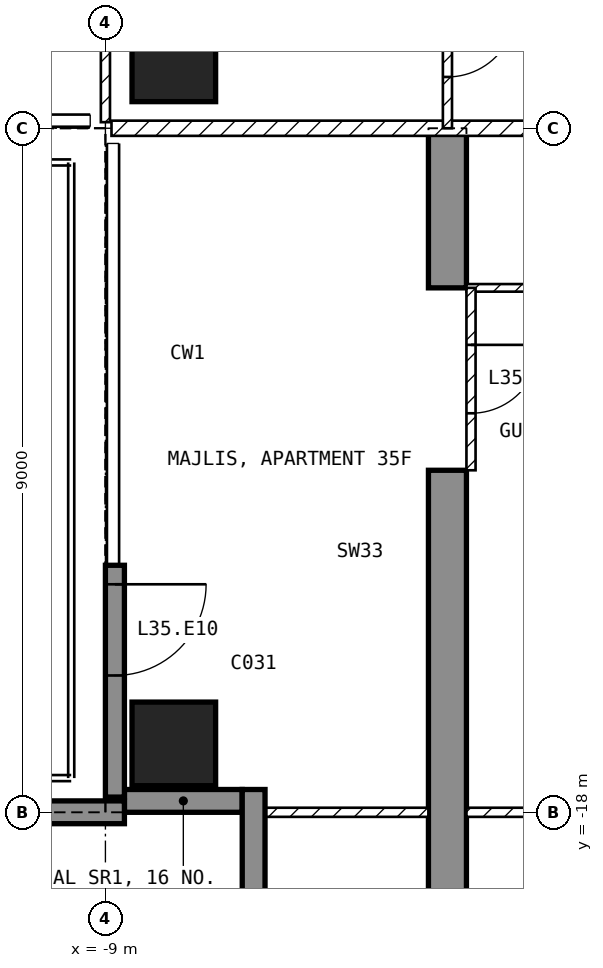
"""IFC4 building model, lengths in metres.
Left out: names, types, materials, properties, quantities, classifications, styles, units other than length and angle.
Written with IfcOpenShell. Run it as: python <this file> out.ifc"""

import sys

from ifc_helpers import new_model, si_unit, direction, frame, frame_2d, origin, origin_2d, place, context, subcontext, project, spatial, polyline, rectangle, outline, extrude, element, fill, save


model = new_model("IFC4")
c1 = context("Model", 3, precision=1e-05, world=origin(), true_north=direction((0.0, 1.0)))
c2 = subcontext(c1, "Body", "Model", "MODEL_VIEW")
j1 = project(units=[si_unit("LENGTHUNIT", "METRE"), si_unit("PLANEANGLEUNIT", "RADIAN")], contexts=[c1])
p1 = place(None, origin())
s1 = spatial("IfcSite", under=j1, at=p1, CompositionType="ELEMENT")
p2 = place(p1, origin())
s2 = spatial("IfcBuilding", under=s1, at=p2, CompositionType="ELEMENT")
p3 = place(p2, frame((0.0, 0.0, 144.4)))
s3 = spatial("IfcBuildingStorey", under=s2, at=p3, CompositionType="ELEMENT", Elevation=144.4)
for number, where, z_axis, x_axis in (
    (1, (-8.1, -17.1, -0.25), (0.0, 0.0, 1.0), (1.0, 0.0, 0.0)),
    (2, (-8.1, -8.1, -0.25), (0.0, 0.0, 1.0), (1.0, 0.0, 0.0)),
):
    element("IfcColumn", number, at=place(p3, frame(where, z_axis=z_axis, x_axis=x_axis)), inside=s3, PredefinedType="COLUMN", context=c2, shape_type="SweptSolid", body=[
        extrude(rectangle(XDim=1.1, YDim=1.1, at=origin_2d()), origin(), (0.0, 0.0, 1.0), 3.5),
    ])
p4 = place(p3, frame((-4.75, -20.15, -0.25), z_axis=(1.0, 0.0, 0.0), x_axis=(0.0, 1.0, 0.0)))
e3 = element("IfcWall", 3, at=p4, inside=s3, PredefinedType="SHEAR", context=c2, shape_type="SweptSolid", body=[
    extrude(outline(polyline([(0.0, 0.0), (6.65, 0.0), (6.65, 2.65), (9.05, 2.65), (9.05, 0.0), (11.15, 0.0), (11.15, 3.5), (0.0, 3.5), (0.0, 0.0)])), origin(), (0.0, 0.0, 1.0), 0.5),
])
p5 = place(p3, frame((-8.875, -14.75, 0.0), z_axis=(0.0, 0.0, 1.0), x_axis=(0.0, -1.0, 0.0)))
e4 = element("IfcWall", 4, at=p5, inside=s3, PredefinedType="SOLIDWALL", context=c2, shape_type="SweptSolid", body=[
    extrude(rectangle(XDim=3.05, YDim=0.25, at=frame_2d((1.525, 0.0))), origin(), (0.0, 0.0, 1.0), 3.25),
])
p6 = place(p5, frame((0.25, 0.0, 0.0)))
e5 = element("IfcOpeningElement", 5, at=p6, cuts=e4, PredefinedType="OPENING", context=c2, shape_type="SweptSolid", body=[
    extrude(rectangle(XDim=1.2, YDim=2.4, at=frame_2d((0.6, 1.2))), frame((0.0, 0.135, 0.0), z_axis=(0.0, -1.0, 0.0), x_axis=(1.0, 0.0, 0.0)), (0.0, 0.0, 1.0), 0.27),
])
p7 = place(p3, frame((-8.75, -17.85, 0.0), z_axis=(0.0, 0.0, 1.0), x_axis=(1.0, 0.0, 0.0)))
e6 = element("IfcWall", 6, at=p7, inside=s3, PredefinedType="SOLIDWALL", context=c2, shape_type="SweptSolid", body=[
    extrude(rectangle(XDim=1.55, YDim=0.3, at=frame_2d((0.775, 0.0))), origin(), (0.0, 0.0, 1.0), 3.25),
])
p8 = place(p3, frame((-7.05, -17.7, 0.0), z_axis=(0.0, 0.0, 1.0), x_axis=(0.0, -1.0, 0.0)))
e7 = element("IfcWall", 7, at=p8, inside=s3, PredefinedType="SOLIDWALL", context=c2, shape_type="SweptSolid", body=[
    extrude(rectangle(XDim=1.8, YDim=0.3, at=frame_2d((0.9, 0.0))), origin(), (0.0, 0.0, 1.0), 3.25),
])
p9 = place(p3, frame((-8.75, -18.0, 0.0), z_axis=(0.0, 0.0, 1.0), x_axis=(-1.0, 0.0, 0.0)))
e8 = element("IfcWall", 8, at=p9, inside=s3, PredefinedType="SOLIDWALL", context=c2, shape_type="SweptSolid", body=[
    extrude(rectangle(XDim=2.99, YDim=0.3, at=frame_2d((1.495, 0.0))), origin(), (0.0, 0.0, 1.0), 3.25),
])
p10 = place(p3, frame((8.92, -9.0, 0.0), z_axis=(0.0, 0.0, 1.0), x_axis=(-1.0, 0.0, 0.0)))
e9 = element("IfcWall", 9, at=p10, inside=s3, PredefinedType="PARTITIONING", context=c2, shape_type="SweptSolid", body=[
    extrude(rectangle(XDim=17.84, YDim=0.2, at=frame_2d((8.92, 0.0))), origin(), (0.0, 0.0, 1.0), 3.25),
])
p11 = place(p10, frame((8.42, 0.0, 0.0)))
e10 = element("IfcOpeningElement", 10, at=p11, cuts=e9, PredefinedType="OPENING", context=c2, shape_type="SweptSolid", body=[
    extrude(rectangle(XDim=1.0, YDim=2.1, at=frame_2d((0.5, 1.05))), frame((0.0, 0.11, 0.0), z_axis=(0.0, -1.0, 0.0), x_axis=(1.0, 0.0, 0.0)), (0.0, 0.0, 1.0), 0.22),
])
p12 = place(p3, frame((-9.0, -1.3, 0.0), z_axis=(0.0, 0.0, 1.0), x_axis=(0.0, -1.0, 0.0)))
e11 = element("IfcWall", 11, at=p12, inside=s3, PredefinedType="PARTITIONING", context=c2, shape_type="SweptSolid", body=[
    extrude(rectangle(XDim=7.62, YDim=0.12, at=frame_2d((3.81, 0.0))), origin(), (0.0, 0.0, 1.0), 3.25),
])
p13 = place(p12, frame((4.2, 0.0, 0.0)))
e12 = element("IfcOpeningElement", 12, at=p13, cuts=e11, PredefinedType="OPENING", context=c2, shape_type="SweptSolid", body=[
    extrude(rectangle(XDim=0.9, YDim=2.1, at=frame_2d((0.45, 1.05))), frame((0.0, 0.07, 0.0), z_axis=(0.0, -1.0, 0.0), x_axis=(1.0, 0.0, 0.0)), (0.0, 0.0, 1.0), 0.14),
])
p14 = place(p3, frame((-4.5, -6.75, 0.0), z_axis=(0.0, 0.0, 1.0), x_axis=(0.0, -1.0, 0.0)))
e13 = element("IfcWall", 13, at=p14, inside=s3, PredefinedType="PARTITIONING", context=c2, shape_type="SweptSolid", body=[
    extrude(rectangle(XDim=2.25, YDim=0.12, at=frame_2d((1.125, 0.0))), origin(), (0.0, 0.0, 1.0), 3.25),
])
p15 = place(p14, frame((0.675, 0.0, 0.0)))
e14 = element("IfcOpeningElement", 14, at=p15, cuts=e13, PredefinedType="OPENING", context=c2, shape_type="SweptSolid", body=[
    extrude(rectangle(XDim=0.9, YDim=2.1, at=frame_2d((0.45, 1.05))), frame((0.0, 0.07, 0.0), z_axis=(0.0, -1.0, 0.0), x_axis=(1.0, 0.0, 0.0)), (0.0, 0.0, 1.0), 0.14),
])
p16 = place(p3, frame((-2.1, -11.1, 0.0), z_axis=(0.0, 0.0, 1.0), x_axis=(-1.0, 0.0, 0.0)))
e15 = element("IfcWall", 15, at=p16, inside=s3, PredefinedType="PARTITIONING", context=c2, shape_type="SweptSolid", body=[
    extrude(rectangle(XDim=2.15, YDim=0.1, at=frame_2d((1.075, 0.0))), origin(), (0.0, 0.0, 1.0), 3.25),
])
p17 = place(p3, frame((4.25, -18.0, 0.0), z_axis=(0.0, 0.0, 1.0), x_axis=(-1.0, 0.0, 0.0)))
e16 = element("IfcWall", 16, at=p17, inside=s3, PredefinedType="PARTITIONING", context=c2, shape_type="SweptSolid", body=[
    extrude(rectangle(XDim=8.5, YDim=0.12, at=frame_2d((4.25, 0.0))), origin(), (0.0, 0.0, 1.0), 3.25),
])
p18 = place(p17, frame((5.675, 0.0, 0.0)))
e17 = element("IfcOpeningElement", 17, at=p18, cuts=e16, PredefinedType="OPENING", context=c2, shape_type="SweptSolid", body=[
    extrude(rectangle(XDim=0.9, YDim=2.1, at=frame_2d((0.45, 1.05))), frame((0.0, 0.07, 0.0), z_axis=(0.0, -1.0, 0.0), x_axis=(1.0, 0.0, 0.0)), (0.0, 0.0, 1.0), 0.14),
])
p19 = place(p3, frame((-4.75, -18.0, 0.0), z_axis=(0.0, 0.0, 1.0), x_axis=(-1.0, 0.0, 0.0)))
e18 = element("IfcWall", 18, at=p19, inside=s3, PredefinedType="PARTITIONING", context=c2, shape_type="SweptSolid", body=[
    extrude(rectangle(XDim=2.37, YDim=0.12, at=frame_2d((1.185, 0.0))), origin(), (0.0, 0.0, 1.0), 3.25),
])
p20 = place(p3, frame((-4.19, -11.1, 0.0), z_axis=(0.0, 0.0, 1.0), x_axis=(0.0, -1.0, 0.0)))
e19 = element("IfcWall", 19, at=p20, inside=s3, PredefinedType="PARTITIONING", context=c2, shape_type="SweptSolid", body=[
    extrude(rectangle(XDim=2.4, YDim=0.12, at=frame_2d((1.2, 0.0))), origin(), (0.0, 0.0, 1.0), 2.4),
])
p21 = place(p20, frame((0.75, 0.0, 0.0)))
e20 = element("IfcOpeningElement", 20, at=p21, cuts=e19, PredefinedType="OPENING", context=c2, shape_type="SweptSolid", body=[
    extrude(rectangle(XDim=0.9, YDim=2.1, at=frame_2d((0.45, 1.05))), frame((0.0, 0.07, 0.0), z_axis=(0.0, -1.0, 0.0), x_axis=(1.0, 0.0, 0.0)), (0.0, 0.0, 1.0), 0.14),
])
p22 = place(p6, origin())
e21 = element("IfcDoor", 21, at=p22, inside=s3, OperationType="SINGLE_SWING_LEFT", PredefinedType="DOOR", context=c2, shape_type="SweptSolid", body=[
    extrude(rectangle(XDim=1.2, YDim=2.4, at=frame_2d((0.6, 1.2))), frame((0.0, 0.025, 0.0), z_axis=(0.0, -1.0, 0.0), x_axis=(1.0, 0.0, 0.0)), (0.0, 0.0, 1.0), 0.05),
])
fill(e5, e21)
p23 = place(p15, origin())
e22 = element("IfcDoor", 22, at=p23, inside=s3, OperationType="SINGLE_SWING_LEFT", PredefinedType="DOOR", context=c2, shape_type="SweptSolid", body=[
    extrude(rectangle(XDim=0.9, YDim=2.1, at=frame_2d((0.45, 1.05))), frame((0.0, 0.025, 0.0), z_axis=(0.0, -1.0, 0.0), x_axis=(1.0, 0.0, 0.0)), (0.0, 0.0, 1.0), 0.05),
])
fill(e14, e22)
p24 = place(p21, origin())
e23 = element("IfcDoor", 23, at=p24, inside=s3, OperationType="SINGLE_SWING_LEFT", PredefinedType="DOOR", context=c2, shape_type="SweptSolid", body=[
    extrude(rectangle(XDim=0.9, YDim=2.1, at=frame_2d((0.45, 1.05))), frame((0.0, 0.025, 0.0), z_axis=(0.0, -1.0, 0.0), x_axis=(1.0, 0.0, 0.0)), (0.0, 0.0, 1.0), 0.05),
])
fill(e20, e23)
save(model, sys.argv[1])
